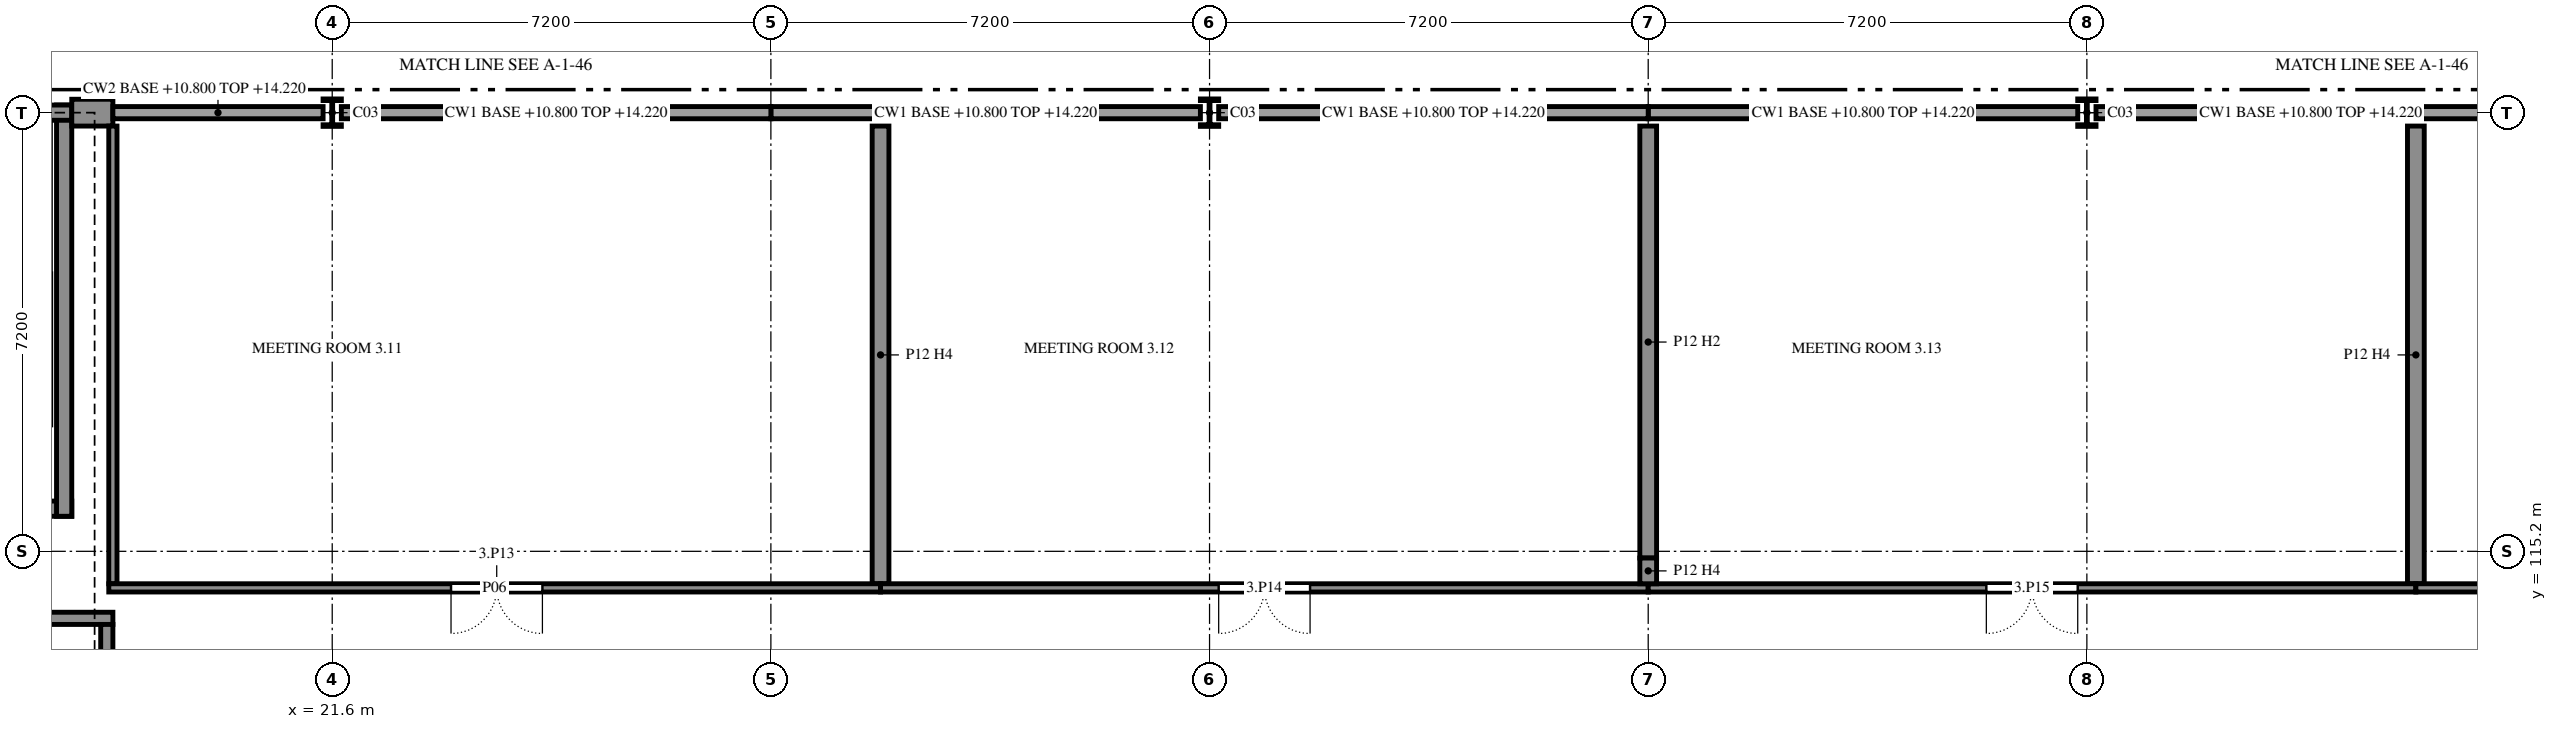
"""IFC4 building model, lengths in metres.
Left out: names, types, materials, properties, quantities, classifications, styles, units other than length and angle.
Written with IfcOpenShell. Run it as: python <this file> out.ifc"""

import sys

from ifc_helpers import new_model, si_unit, direction, frame, frame_2d, origin, origin_2d, place, context, subcontext, project, spatial, rectangle, i_section, extrude, element, fill, save


model = new_model("IFC4")
c1 = context("Model", 3, precision=1e-05, world=origin(), true_north=direction((0.0, 1.0)))
c2 = subcontext(c1, "Body", "Model", "MODEL_VIEW")
j1 = project(units=[si_unit("LENGTHUNIT", "METRE"), si_unit("PLANEANGLEUNIT", "RADIAN")], contexts=[c1])
p1 = place(None, origin())
s1 = spatial("IfcSite", under=j1, at=p1, CompositionType="ELEMENT")
p2 = place(p1, origin())
s2 = spatial("IfcBuilding", under=s1, at=p2, CompositionType="ELEMENT")
p3 = place(p2, frame((0.0, 0.0, 10.8)))
s3 = spatial("IfcBuildingStorey", under=s2, at=p3, CompositionType="ELEMENT", Elevation=10.8)
for number, where, z_axis, x_axis in (
    (1, (21.6, 122.4, 0.0), (0.0, 0.0, 1.0), (1.0, 0.0, 0.0)),
    (2, (36.0, 122.4, 0.0), (0.0, 0.0, 1.0), (1.0, 0.0, 0.0)),
    (3, (50.4, 122.4, 0.0), (0.0, 0.0, 1.0), (1.0, 0.0, 0.0)),
):
    element("IfcColumn", number, at=place(p3, frame(where, z_axis=z_axis, x_axis=x_axis)), inside=s3, PredefinedType="COLUMN", context=c2, shape_type="SweptSolid", body=[
        extrude(i_section(OverallWidth=0.3, OverallDepth=0.45, WebThickness=0.014, FlangeThickness=0.026, FilletRadius=0.027, at=origin_2d()), origin(), (0.0, 0.0, 1.0), 3.6),
    ])
p4 = place(p3, frame((12.325, 115.9, 0.0), z_axis=(0.0, 0.0, 1.0), x_axis=(1.0, 0.0, 0.0)))
e4 = element("IfcWall", 4, at=p4, inside=s3, PredefinedType="SHEAR", context=c2, shape_type="SweptSolid", body=[
    extrude(rectangle(XDim=5.0, YDim=0.25, at=frame_2d((2.5, 0.0))), origin(), (0.0, 0.0, 1.0), 3.6),
])
p5 = place(p4, frame((1.75, 0.0, 0.0)))
e5 = element("IfcOpeningElement", 5, at=p5, cuts=e4, PredefinedType="OPENING", context=c2, shape_type="SweptSolid", body=[
    extrude(rectangle(XDim=1.2, YDim=2.4, at=frame_2d((0.6, 1.2))), frame((0.0, 0.135, 0.0), z_axis=(0.0, -1.0, 0.0), x_axis=(1.0, 0.0, 0.0)), (0.0, 0.0, 1.0), 0.27),
])
p6 = place(p3, frame((17.2, 115.775, 0.0), z_axis=(0.0, 0.0, 1.0), x_axis=(0.0, 1.0, 0.0)))
e6 = element("IfcWall", 6, at=p6, inside=s3, PredefinedType="SHEAR", context=c2, shape_type="SweptSolid", body=[
    extrude(rectangle(XDim=6.75, YDim=0.25, at=frame_2d((3.375, 0.0))), origin(), (0.0, 0.0, 1.0), 3.6),
])
p7 = place(p3, frame((17.325, 122.4, 0.0), z_axis=(0.0, 0.0, 1.0), x_axis=(-1.0, 0.0, 0.0)))
e7 = element("IfcWall", 7, at=p7, inside=s3, PredefinedType="SHEAR", context=c2, shape_type="SweptSolid", body=[
    extrude(rectangle(XDim=5.0, YDim=0.25, at=frame_2d((2.5, 0.0))), origin(), (0.0, 0.0, 1.0), 3.6),
])
p8 = place(p7, frame((2.175, 0.0, 0.6)))
e8 = element("IfcOpeningElement", 8, at=p8, cuts=e7, PredefinedType="OPENING", context=c2, shape_type="SweptSolid", body=[
    extrude(rectangle(XDim=0.9, YDim=2.1, at=frame_2d((0.45, 1.05))), frame((0.0, 0.135, 0.0), z_axis=(0.0, -1.0, 0.0), x_axis=(1.0, 0.0, 0.0)), (0.0, 0.0, 1.0), 0.27),
])
p9 = place(p3, frame((18.0, 122.4, 0.0), z_axis=(0.0, 0.0, 1.0), x_axis=(-1.0, 0.0, 0.0)))
e9 = element("IfcWall", 9, at=p9, inside=s3, PredefinedType="SOLIDWALL", context=c2, shape_type="SweptSolid", body=[
    extrude(rectangle(XDim=0.675, YDim=0.44, at=frame_2d((0.337, 0.0))), origin(), (0.0, 0.0, 1.0), 3.42),
])
p10 = place(p3, frame((15.0, 114.1, 0.0), z_axis=(0.0, 0.0, 1.0), x_axis=(1.0, 0.0, 0.0)))
e10 = element("IfcWall", 10, at=p10, inside=s3, PredefinedType="SHEAR", context=c2, shape_type="SweptSolid", body=[
    extrude(rectangle(XDim=3.0, YDim=0.2, at=frame_2d((1.5, 0.0))), origin(), (0.0, 0.0, 1.0), 3.6),
])
p11 = place(p3, frame((17.9, 111.8, 0.0), z_axis=(0.0, 0.0, 1.0), x_axis=(0.0, 1.0, 0.0)))
e11 = element("IfcWall", 11, at=p11, inside=s3, PredefinedType="SHEAR", context=c2, shape_type="SweptSolid", body=[
    extrude(rectangle(XDim=2.2, YDim=0.2, at=frame_2d((1.1, 0.0))), origin(), (0.0, 0.0, 1.0), 3.6),
])
p12 = place(p3, frame((18.0, 122.18, 0.0), z_axis=(0.0, 0.0, 1.0), x_axis=(0.0, -1.0, 0.0)))
e12 = element("IfcWall", 12, at=p12, inside=s3, PredefinedType="PARTITIONING", context=c2, shape_type="SweptSolid", body=[
    extrude(rectangle(XDim=7.512, YDim=0.135, at=frame_2d((3.756, 0.0))), origin(), (0.0, 0.0, 1.0), 3.12),
])
p13 = place(p3, frame((30.6, 122.18, 0.0), z_axis=(0.0, 0.0, 1.0), x_axis=(0.0, -1.0, 0.0)))
e13 = element("IfcWall", 13, at=p13, inside=s3, PredefinedType="PARTITIONING", context=c2, shape_type="SweptSolid", body=[
    extrude(rectangle(XDim=7.512, YDim=0.275, at=frame_2d((3.756, 0.0))), origin(), (0.0, 0.0, 1.0), 3.42),
])
p14 = place(p3, frame((30.6, 114.6, 0.0), z_axis=(0.0, 0.0, 1.0), x_axis=(-1.0, 0.0, 0.0)))
e14 = element("IfcWall", 14, at=p14, inside=s3, PredefinedType="PARTITIONING", context=c2, shape_type="SweptSolid", body=[
    extrude(rectangle(XDim=12.667, YDim=0.135, at=frame_2d((6.334, 0.0))), origin(), (0.0, 0.0, 1.0), 3.42),
])
p15 = place(p14, frame((5.55, 0.0, 0.0)))
e15 = element("IfcOpeningElement", 15, at=p15, cuts=e14, PredefinedType="OPENING", context=c2, shape_type="SweptSolid", body=[
    extrude(rectangle(XDim=1.5, YDim=2.1, at=frame_2d((0.75, 1.05))), frame((0.0, 0.077, 0.0), z_axis=(0.0, -1.0, 0.0), x_axis=(1.0, 0.0, 0.0)), (0.0, 0.0, 1.0), 0.155),
])
p16 = place(p3, frame((43.2, 122.18, 0.0), z_axis=(0.0, 0.0, 1.0), x_axis=(0.0, -1.0, 0.0)))
e16 = element("IfcWall", 16, at=p16, inside=s3, PredefinedType="PARTITIONING", context=c2, shape_type="SweptSolid", body=[
    extrude(rectangle(XDim=7.09, YDim=0.275, at=frame_2d((3.545, 0.0))), origin(), (0.0, 0.0, 1.0), 3.12),
])
p17 = place(p3, frame((43.2, 114.6, 0.0), z_axis=(0.0, 0.0, 1.0), x_axis=(-1.0, 0.0, 0.0)))
e17 = element("IfcWall", 17, at=p17, inside=s3, PredefinedType="PARTITIONING", context=c2, shape_type="SweptSolid", body=[
    extrude(rectangle(XDim=12.6, YDim=0.135, at=frame_2d((6.3, 0.0))), origin(), (0.0, 0.0, 1.0), 3.42),
])
p18 = place(p17, frame((5.55, 0.0, 0.0)))
e18 = element("IfcOpeningElement", 18, at=p18, cuts=e17, PredefinedType="OPENING", context=c2, shape_type="SweptSolid", body=[
    extrude(rectangle(XDim=1.5, YDim=2.1, at=frame_2d((0.75, 1.05))), frame((0.0, 0.077, 0.0), z_axis=(0.0, -1.0, 0.0), x_axis=(1.0, 0.0, 0.0)), (0.0, 0.0, 1.0), 0.155),
])
p19 = place(p3, frame((55.8, 122.18, 0.0), z_axis=(0.0, 0.0, 1.0), x_axis=(0.0, -1.0, 0.0)))
e19 = element("IfcWall", 19, at=p19, inside=s3, PredefinedType="PARTITIONING", context=c2, shape_type="SweptSolid", body=[
    extrude(rectangle(XDim=7.512, YDim=0.275, at=frame_2d((3.756, 0.0))), origin(), (0.0, 0.0, 1.0), 3.42),
])
p20 = place(p3, frame((55.8, 114.6, 0.0), z_axis=(0.0, 0.0, 1.0), x_axis=(-1.0, 0.0, 0.0)))
e20 = element("IfcWall", 20, at=p20, inside=s3, PredefinedType="PARTITIONING", context=c2, shape_type="SweptSolid", body=[
    extrude(rectangle(XDim=12.6, YDim=0.135, at=frame_2d((6.3, 0.0))), origin(), (0.0, 0.0, 1.0), 3.42),
])
p21 = place(p20, frame((5.55, 0.0, 0.0)))
e21 = element("IfcOpeningElement", 21, at=p21, cuts=e20, PredefinedType="OPENING", context=c2, shape_type="SweptSolid", body=[
    extrude(rectangle(XDim=1.5, YDim=2.1, at=frame_2d((0.75, 1.05))), frame((0.0, 0.077, 0.0), z_axis=(0.0, -1.0, 0.0), x_axis=(1.0, 0.0, 0.0)), (0.0, 0.0, 1.0), 0.155),
])
p22 = place(p3, frame((68.468, 114.6, 0.0), z_axis=(0.0, 0.0, 1.0), x_axis=(-1.0, 0.0, 0.0)))
e22 = element("IfcWall", 22, at=p22, inside=s3, PredefinedType="PARTITIONING", context=c2, shape_type="SweptSolid", body=[
    extrude(rectangle(XDim=12.667, YDim=0.135, at=frame_2d((6.334, 0.0))), origin(), (0.0, 0.0, 1.0), 3.42),
])
p23 = place(p22, frame((5.55, 0.0, 0.0)))
e23 = element("IfcOpeningElement", 23, at=p23, cuts=e22, PredefinedType="OPENING", context=c2, shape_type="SweptSolid", body=[
    extrude(rectangle(XDim=1.5, YDim=2.1, at=frame_2d((0.75, 1.05))), frame((0.0, 0.077, 0.0), z_axis=(0.0, -1.0, 0.0), x_axis=(1.0, 0.0, 0.0)), (0.0, 0.0, 1.0), 0.155),
])
p24 = place(p3, frame((43.2, 115.09, 0.0), z_axis=(0.0, 0.0, 1.0), x_axis=(0.0, -1.0, 0.0)))
e24 = element("IfcWall", 24, at=p24, inside=s3, PredefinedType="PARTITIONING", context=c2, shape_type="SweptSolid", body=[
    extrude(rectangle(XDim=0.423, YDim=0.275, at=frame_2d((0.211, 0.0))), origin(), (0.0, 0.0, 1.0), 3.42),
])
p25 = place(p15, origin())
e25 = element("IfcDoor", 25, at=p25, inside=s3, OperationType="DOUBLE_DOOR_SINGLE_SWING", PredefinedType="DOOR", context=c2, shape_type="SweptSolid", body=[
    extrude(rectangle(XDim=1.5, YDim=2.1, at=frame_2d((0.75, 1.05))), frame((0.0, 0.025, 0.0), z_axis=(0.0, -1.0, 0.0), x_axis=(1.0, 0.0, 0.0)), (0.0, 0.0, 1.0), 0.05),
])
fill(e15, e25)
p26 = place(p18, origin())
e26 = element("IfcDoor", 26, at=p26, inside=s3, OperationType="DOUBLE_DOOR_SINGLE_SWING", PredefinedType="DOOR", context=c2, shape_type="SweptSolid", body=[
    extrude(rectangle(XDim=1.5, YDim=2.1, at=frame_2d((0.75, 1.05))), frame((0.0, 0.025, 0.0), z_axis=(0.0, -1.0, 0.0), x_axis=(1.0, 0.0, 0.0)), (0.0, 0.0, 1.0), 0.05),
])
fill(e18, e26)
p27 = place(p21, origin())
e27 = element("IfcDoor", 27, at=p27, inside=s3, OperationType="DOUBLE_DOOR_SINGLE_SWING", PredefinedType="DOOR", context=c2, shape_type="SweptSolid", body=[
    extrude(rectangle(XDim=1.5, YDim=2.1, at=frame_2d((0.75, 1.05))), frame((0.0, 0.025, 0.0), z_axis=(0.0, -1.0, 0.0), x_axis=(1.0, 0.0, 0.0)), (0.0, 0.0, 1.0), 0.05),
])
fill(e21, e27)
save(model, sys.argv[1])
